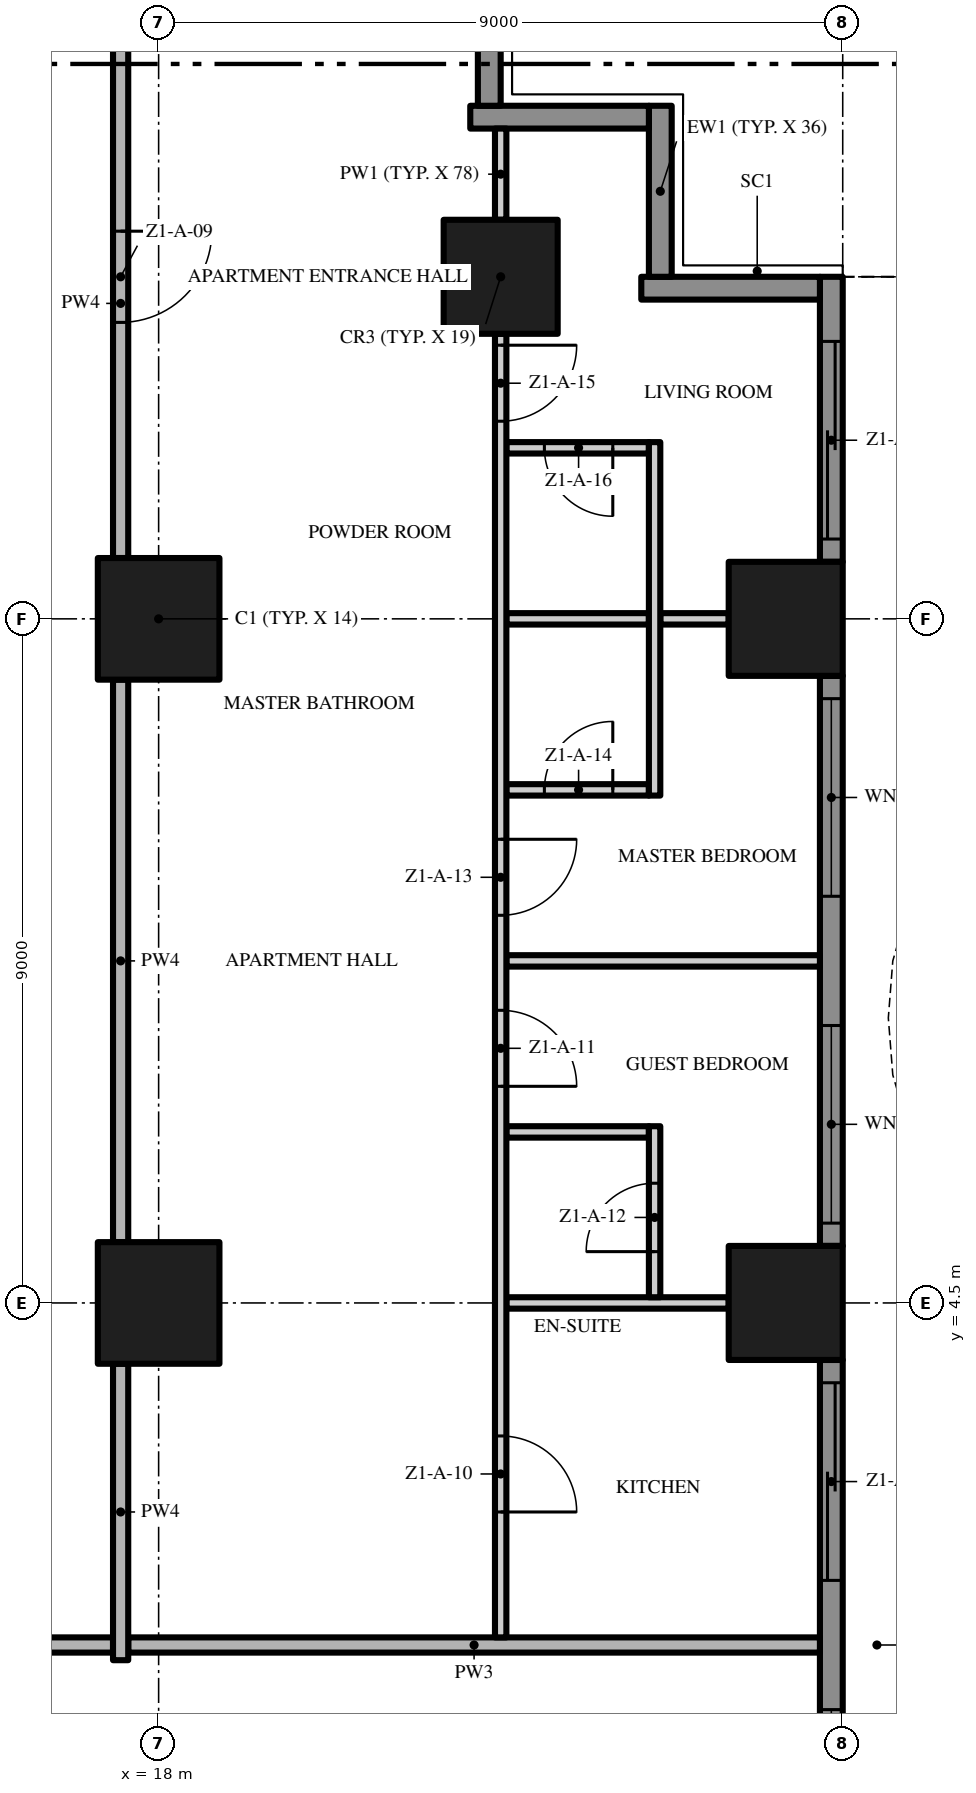
"""IFC4 building model, lengths in metres.
Left out: names, types, materials, properties, quantities, classifications, styles, units other than length and angle.
Written with IfcOpenShell. Run it as: python <this file> out.ifc"""

import sys

from ifc_helpers import new_model, si_unit, direction, frame, frame_2d, origin, origin_2d, place, context, subcontext, project, spatial, polyline, rectangle, outline, extrude, element, fill, save


model = new_model("IFC4")
c1 = context("Model", 3, precision=1e-05, world=origin(), true_north=direction((0.0, 1.0)))
c2 = subcontext(c1, "Body", "Model", "MODEL_VIEW")
j1 = project(units=[si_unit("LENGTHUNIT", "METRE"), si_unit("PLANEANGLEUNIT", "RADIAN")], contexts=[c1])
p1 = place(None, origin())
s1 = spatial("IfcSite", under=j1, at=p1, CompositionType="ELEMENT")
p2 = place(p1, origin())
s2 = spatial("IfcBuilding", under=s1, at=p2, CompositionType="ELEMENT")
p3 = place(p2, frame((0.0, 0.0, 15.0)))
s3 = spatial("IfcBuildingStorey", under=s2, at=p3, CompositionType="ELEMENT", Elevation=15.0)
for number, where, z_axis, x_axis in (
    (1, (18.0, 13.5, 0.0), (0.0, 0.0, 1.0), (1.0, 0.0, 0.0)),
    (2, (18.0, 4.5, 0.0), (0.0, 0.0, 1.0), (1.0, 0.0, 0.0)),
):
    element("IfcColumn", number, at=place(p3, frame(where, z_axis=z_axis, x_axis=x_axis)), inside=s3, PredefinedType="COLUMN", context=c2, shape_type="SweptSolid", body=[
        extrude(rectangle(XDim=1.6, YDim=1.6, at=origin_2d()), origin(), (0.0, 0.0, 1.0), 3.5),
    ])
for number, where, z_axis, x_axis in (
    (3, (26.25, 13.5, 0.0), (0.0, 0.0, 1.0), (1.0, 0.0, 0.0)),
    (4, (22.5, 18.0, 0.0), (0.0, 0.0, 1.0), (1.0, 0.0, 0.0)),
    (5, (26.25, 4.5, 0.0), (0.0, 0.0, 1.0), (1.0, 0.0, 0.0)),
):
    element("IfcColumn", number, at=place(p3, frame(where, z_axis=z_axis, x_axis=x_axis)), inside=s3, PredefinedType="COLUMN", context=c2, shape_type="SweptSolid", body=[
        extrude(rectangle(XDim=1.5, YDim=1.5, at=origin_2d()), origin(), (0.0, 0.0, 1.0), 3.5),
    ])
p4 = place(p3, frame((26.85, 3.75, 0.0), z_axis=(0.0, 0.0, 1.0), x_axis=(0.0, -1.0, 0.0)))
e6 = element("IfcWall", 6, at=p4, inside=s3, PredefinedType="SOLIDWALL", context=c2, shape_type="SweptSolid", body=[
    extrude(rectangle(XDim=7.5, YDim=0.3, at=frame_2d((3.75, 0.0))), origin(), (0.0, 0.0, 1.0), 3.5),
])
p5 = place(p4, frame((4.6, 0.0, 0.45)))
e7 = element("IfcOpeningElement", 7, at=p5, cuts=e6, PredefinedType="OPENING", context=c2, shape_type="SweptSolid", body=[
    extrude(rectangle(XDim=2.6, YDim=2.65, at=frame_2d((1.3, 1.325))), frame((0.0, 0.16, 0.0), z_axis=(0.0, -1.0, 0.0), x_axis=(1.0, 0.0, 0.0)), (0.0, 0.0, 1.0), 0.32),
])
p6 = place(p4, frame((0.3, 0.0, 0.0)))
e8 = element("IfcOpeningElement", 8, at=p6, cuts=e6, PredefinedType="OPENING", context=c2, shape_type="SweptSolid", body=[
    extrude(rectangle(XDim=2.6, YDim=2.4, at=frame_2d((1.3, 1.2))), frame((0.0, 0.16, 0.0), z_axis=(0.0, -1.0, 0.0), x_axis=(1.0, 0.0, 0.0)), (0.0, 0.0, 1.0), 0.32),
])
p7 = place(p3, frame((26.85, 12.75, 0.0), z_axis=(0.0, 0.0, 1.0), x_axis=(0.0, -1.0, 0.0)))
e9 = element("IfcWall", 9, at=p7, inside=s3, PredefinedType="SOLIDWALL", context=c2, shape_type="SweptSolid", body=[
    extrude(rectangle(XDim=7.5, YDim=0.3, at=frame_2d((3.75, 0.0))), origin(), (0.0, 0.0, 1.0), 3.5),
])
p8 = place(p7, frame((4.6, 0.0, 0.45)))
e10 = element("IfcOpeningElement", 10, at=p8, cuts=e9, PredefinedType="OPENING", context=c2, shape_type="SweptSolid", body=[
    extrude(rectangle(XDim=2.6, YDim=2.65, at=frame_2d((1.3, 1.325))), frame((0.0, 0.16, 0.0), z_axis=(0.0, -1.0, 0.0), x_axis=(1.0, 0.0, 0.0)), (0.0, 0.0, 1.0), 0.32),
])
p9 = place(p7, frame((0.3, 0.0, 0.45)))
e11 = element("IfcOpeningElement", 11, at=p9, cuts=e9, PredefinedType="OPENING", context=c2, shape_type="SweptSolid", body=[
    extrude(rectangle(XDim=2.6, YDim=2.65, at=frame_2d((1.3, 1.325))), frame((0.0, 0.16, 0.0), z_axis=(0.0, -1.0, 0.0), x_axis=(1.0, 0.0, 0.0)), (0.0, 0.0, 1.0), 0.32),
])
p10 = place(p3, frame((26.85, 18.0, 0.0), z_axis=(0.0, 0.0, 1.0), x_axis=(0.0, -1.0, 0.0)))
e12 = element("IfcWall", 12, at=p10, inside=s3, PredefinedType="SOLIDWALL", context=c2, shape_type="SweptSolid", body=[
    extrude(rectangle(XDim=3.75, YDim=0.3, at=frame_2d((1.875, 0.0))), origin(), (0.0, 0.0, 1.0), 3.5),
])
p11 = place(p10, frame((0.85, 0.0, 0.0)))
e13 = element("IfcOpeningElement", 13, at=p11, cuts=e12, PredefinedType="OPENING", context=c2, shape_type="SweptSolid", body=[
    extrude(rectangle(XDim=2.6, YDim=2.4, at=frame_2d((1.3, 1.2))), frame((0.0, 0.16, 0.0), z_axis=(0.0, -1.0, 0.0), x_axis=(1.0, 0.0, 0.0)), (0.0, 0.0, 1.0), 0.32),
])
p12 = place(p3, frame((24.35, 17.85, 0.0), z_axis=(0.0, 0.0, 1.0), x_axis=(1.0, 0.0, 0.0)))
e14 = element("IfcWall", 14, at=p12, inside=s3, PredefinedType="SOLIDWALL", context=c2, shape_type="SweptSolid", body=[
    extrude(rectangle(XDim=2.35, YDim=0.3, at=frame_2d((1.175, 0.0))), origin(), (0.0, 0.0, 1.0), 3.5),
])
p13 = place(p3, frame((24.6, 20.25, 0.0), z_axis=(0.0, 0.0, 1.0), x_axis=(0.0, -1.0, 0.0)))
e15 = element("IfcWall", 15, at=p13, inside=s3, PredefinedType="SOLIDWALL", context=c2, shape_type="SweptSolid", body=[
    extrude(rectangle(XDim=2.25, YDim=0.3, at=frame_2d((1.125, 0.0))), origin(), (0.0, 0.0, 1.0), 3.5),
])
p14 = place(p3, frame((22.1, 20.1, 0.0), z_axis=(0.0, 0.0, 1.0), x_axis=(1.0, 0.0, 0.0)))
e16 = element("IfcWall", 16, at=p14, inside=s3, PredefinedType="SOLIDWALL", context=c2, shape_type="SweptSolid", body=[
    extrude(rectangle(XDim=2.35, YDim=0.3, at=frame_2d((1.175, 0.0))), origin(), (0.0, 0.0, 1.0), 3.5),
])
p15 = place(p3, frame((22.35, 22.5, 0.0), z_axis=(0.0, 0.0, 1.0), x_axis=(0.0, -1.0, 0.0)))
e17 = element("IfcWall", 17, at=p15, inside=s3, PredefinedType="SOLIDWALL", context=c2, shape_type="SweptSolid", body=[
    extrude(rectangle(XDim=2.25, YDim=0.3, at=frame_2d((1.125, 0.0))), origin(), (0.0, 0.0, 1.0), 3.5),
])
p16 = place(p3, origin())
e18 = element("IfcWall", 18, at=p16, inside=s3, PredefinedType="USERDEFINED", context=c2, shape_type="SweptSolid", body=[
    extrude(outline(polyline([(28.8, -18.0), (29.505, -16.5), (29.941, -15.0), (30.0, -14.25), (29.941, -13.5), (29.505, -12.0), (28.8, -10.5), (28.095, -9.0), (27.659, -7.5), (27.6, -6.75), (27.659, -6.0), (28.095, -4.5), (28.8, -3.0), (29.505, -1.5), (29.941, 0.0), (30.0, 0.75), (29.941, 1.5), (29.505, 3.0), (28.8, 4.5), (28.095, 6.0), (27.659, 7.5), (27.6, 8.25), (27.659, 9.0), (28.095, 10.5), (28.8, 12.0), (29.505, 13.5), (29.941, 15.0), (30.0, 15.75), (29.941, 16.5), (29.505, 18.0), (29.265, 17.93), (29.694, 16.455), (29.749, 15.75), (29.694, 15.045), (29.271, 13.589), (28.574, 12.106), (27.86, 10.589), (27.411, 9.045), (27.349, 8.25), (27.411, 7.455), (27.86, 5.911), (28.574, 4.394), (29.271, 2.911), (29.694, 1.455), (29.749, 0.75), (29.694, 0.045), (29.271, -1.411), (28.574, -2.894), (27.86, -4.411), (27.411, -5.955), (27.349, -6.75), (27.411, -7.545), (27.86, -9.089), (28.574, -10.606), (29.271, -12.089), (29.694, -13.545), (29.749, -14.25), (29.694, -14.955), (29.271, -16.411), (28.574, -17.894), (28.8, -18.0)])), origin(), (0.0, 0.0, 1.0), 0.9),
])
p17 = place(p3, frame((17.4, 0.0, 0.0), z_axis=(0.0, 0.0, 1.0), x_axis=(-1.0, 0.0, 0.0)))
e19 = element("IfcWall", 19, at=p17, inside=s3, PredefinedType="PARTITIONING", context=c2, shape_type="SweptSolid", body=[
    extrude(rectangle(XDim=17.3, YDim=0.2, at=frame_2d((8.65, 0.0))), origin(), (0.0, 0.0, 1.0), 3.5),
])
p18 = place(p17, frame((7.65, 0.0, 0.0)))
e20 = element("IfcOpeningElement", 20, at=p18, cuts=e19, PredefinedType="OPENING", context=c2, shape_type="SweptSolid", body=[
    extrude(rectangle(XDim=1.5, YDim=2.4, at=frame_2d((0.75, 1.2))), frame((0.0, 0.11, 0.0), z_axis=(0.0, -1.0, 0.0), x_axis=(1.0, 0.0, 0.0)), (0.0, 0.0, 1.0), 0.22),
])
p19 = place(p3, frame((17.6, 0.0, 0.0), z_axis=(0.0, 0.0, 1.0), x_axis=(1.0, 0.0, 0.0)))
e21 = element("IfcWall", 21, at=p19, inside=s3, PredefinedType="PARTITIONING", context=c2, shape_type="SweptSolid", body=[
    extrude(rectangle(XDim=9.1, YDim=0.2, at=frame_2d((4.55, 0.0))), origin(), (0.0, 0.0, 1.0), 3.5),
])
p20 = place(p3, frame((22.575, 4.5, 0.0), z_axis=(0.0, 0.0, 1.0), x_axis=(1.0, 0.0, 0.0)))
e22 = element("IfcWall", 22, at=p20, inside=s3, PredefinedType="PARTITIONING", context=c2, shape_type="SweptSolid", body=[
    extrude(rectangle(XDim=2.925, YDim=0.15, at=frame_2d((1.462, 0.0))), origin(), (0.0, 0.0, 1.0), 3.5),
])
p21 = place(p3, frame((22.575, 6.75, 0.0), z_axis=(0.0, 0.0, 1.0), x_axis=(1.0, 0.0, 0.0)))
e23 = element("IfcWall", 23, at=p21, inside=s3, PredefinedType="PARTITIONING", context=c2, shape_type="SweptSolid", body=[
    extrude(rectangle(XDim=1.875, YDim=0.15, at=frame_2d((0.938, 0.0))), origin(), (0.0, 0.0, 1.0), 3.5),
])
p22 = place(p3, frame((22.575, 9.0, 0.0), z_axis=(0.0, 0.0, 1.0), x_axis=(1.0, 0.0, 0.0)))
e24 = element("IfcWall", 24, at=p22, inside=s3, PredefinedType="PARTITIONING", context=c2, shape_type="SweptSolid", body=[
    extrude(rectangle(XDim=4.125, YDim=0.15, at=frame_2d((2.062, 0.0))), origin(), (0.0, 0.0, 1.0), 3.5),
])
p23 = place(p3, frame((22.575, 11.25, 0.0), z_axis=(0.0, 0.0, 1.0), x_axis=(1.0, 0.0, 0.0)))
e25 = element("IfcWall", 25, at=p23, inside=s3, PredefinedType="PARTITIONING", context=c2, shape_type="SweptSolid", body=[
    extrude(rectangle(XDim=1.875, YDim=0.15, at=frame_2d((0.938, 0.0))), origin(), (0.0, 0.0, 1.0), 3.5),
])
p24 = place(p23, frame((0.5, 0.0, 0.0)))
e26 = element("IfcOpeningElement", 26, at=p24, cuts=e25, PredefinedType="OPENING", context=c2, shape_type="SweptSolid", body=[
    extrude(rectangle(XDim=0.9, YDim=2.1, at=frame_2d((0.45, 1.05))), frame((0.0, 0.085, 0.0), z_axis=(0.0, -1.0, 0.0), x_axis=(1.0, 0.0, 0.0)), (0.0, 0.0, 1.0), 0.17),
])
p25 = place(p3, frame((22.575, 13.5, 0.0), z_axis=(0.0, 0.0, 1.0), x_axis=(1.0, 0.0, 0.0)))
e27 = element("IfcWall", 27, at=p25, inside=s3, PredefinedType="PARTITIONING", context=c2, shape_type="SweptSolid", body=[
    extrude(rectangle(XDim=1.875, YDim=0.15, at=frame_2d((0.938, 0.0))), origin(), (0.0, 0.0, 1.0), 3.5),
])
p26 = place(p3, frame((24.6, 13.5, 0.0), z_axis=(0.0, 0.0, 1.0), x_axis=(1.0, 0.0, 0.0)))
e28 = element("IfcWall", 28, at=p26, inside=s3, PredefinedType="PARTITIONING", context=c2, shape_type="SweptSolid", body=[
    extrude(rectangle(XDim=0.9, YDim=0.15, at=frame_2d((0.45, 0.0))), origin(), (0.0, 0.0, 1.0), 3.5),
])
p27 = place(p3, frame((24.45, 15.75, 0.0), z_axis=(0.0, 0.0, 1.0), x_axis=(-1.0, 0.0, 0.0)))
e29 = element("IfcWall", 29, at=p27, inside=s3, PredefinedType="PARTITIONING", context=c2, shape_type="SweptSolid", body=[
    extrude(rectangle(XDim=1.875, YDim=0.15, at=frame_2d((0.938, 0.0))), origin(), (0.0, 0.0, 1.0), 3.5),
])
p28 = place(p27, frame((0.475, 0.0, 0.0)))
e30 = element("IfcOpeningElement", 30, at=p28, cuts=e29, PredefinedType="OPENING", context=c2, shape_type="SweptSolid", body=[
    extrude(rectangle(XDim=0.9, YDim=2.1, at=frame_2d((0.45, 1.05))), frame((0.0, 0.085, 0.0), z_axis=(0.0, -1.0, 0.0), x_axis=(1.0, 0.0, 0.0)), (0.0, 0.0, 1.0), 0.17),
])
p29 = place(p3, frame((17.5, -0.2, 0.0), z_axis=(0.0, 0.0, 1.0), x_axis=(0.0, 1.0, 0.0)))
e31 = element("IfcWall", 31, at=p29, inside=s3, PredefinedType="PARTITIONING", context=c2, shape_type="SweptSolid", body=[
    extrude(rectangle(XDim=3.9, YDim=0.2, at=frame_2d((1.95, 0.0))), origin(), (0.0, 0.0, 1.0), 3.5),
])
p30 = place(p3, frame((17.5, 5.3, 0.0), z_axis=(0.0, 0.0, 1.0), x_axis=(0.0, 1.0, 0.0)))
e32 = element("IfcWall", 32, at=p30, inside=s3, PredefinedType="PARTITIONING", context=c2, shape_type="SweptSolid", body=[
    extrude(rectangle(XDim=7.4, YDim=0.2, at=frame_2d((3.7, 0.0))), origin(), (0.0, 0.0, 1.0), 3.5),
])
p31 = place(p3, frame((17.5, 21.0, 0.0), z_axis=(0.0, 0.0, 1.0), x_axis=(0.0, -1.0, 0.0)))
e33 = element("IfcWall", 33, at=p31, inside=s3, PredefinedType="PARTITIONING", context=c2, shape_type="SweptSolid", body=[
    extrude(rectangle(XDim=6.7, YDim=0.2, at=frame_2d((3.35, 0.0))), origin(), (0.0, 0.0, 1.0), 3.5),
])
p32 = place(p31, frame((2.4, 0.0, 0.0)))
e34 = element("IfcOpeningElement", 34, at=p32, cuts=e33, PredefinedType="OPENING", context=c2, shape_type="SweptSolid", body=[
    extrude(rectangle(XDim=1.2, YDim=2.4, at=frame_2d((0.6, 1.2))), frame((0.0, 0.11, 0.0), z_axis=(0.0, -1.0, 0.0), x_axis=(1.0, 0.0, 0.0)), (0.0, 0.0, 1.0), 0.22),
])
p33 = place(p3, frame((22.5, 17.25, 0.0), z_axis=(0.0, 0.0, 1.0), x_axis=(0.0, -1.0, 0.0)))
e35 = element("IfcWall", 35, at=p33, inside=s3, PredefinedType="PARTITIONING", context=c2, shape_type="SweptSolid", body=[
    extrude(rectangle(XDim=17.15, YDim=0.15, at=frame_2d((8.575, 0.0))), origin(), (0.0, 0.0, 1.0), 3.5),
])
p34 = place(p33, frame((14.5, 0.0, 0.0)))
e36 = element("IfcOpeningElement", 36, at=p34, cuts=e35, PredefinedType="OPENING", context=c2, shape_type="SweptSolid", body=[
    extrude(rectangle(XDim=1.0, YDim=2.4, at=frame_2d((0.5, 1.2))), frame((0.0, 0.085, 0.0), z_axis=(0.0, -1.0, 0.0), x_axis=(1.0, 0.0, 0.0)), (0.0, 0.0, 1.0), 0.17),
])
p35 = place(p33, frame((8.9, 0.0, 0.0)))
e37 = element("IfcOpeningElement", 37, at=p35, cuts=e35, PredefinedType="OPENING", context=c2, shape_type="SweptSolid", body=[
    extrude(rectangle(XDim=1.0, YDim=2.4, at=frame_2d((0.5, 1.2))), frame((0.0, 0.085, 0.0), z_axis=(0.0, -1.0, 0.0), x_axis=(1.0, 0.0, 0.0)), (0.0, 0.0, 1.0), 0.17),
])
p36 = place(p33, frame((6.65, 0.0, 0.0)))
e38 = element("IfcOpeningElement", 38, at=p36, cuts=e35, PredefinedType="OPENING", context=c2, shape_type="SweptSolid", body=[
    extrude(rectangle(XDim=1.0, YDim=2.4, at=frame_2d((0.5, 1.2))), frame((0.0, 0.085, 0.0), z_axis=(0.0, -1.0, 0.0), x_axis=(1.0, 0.0, 0.0)), (0.0, 0.0, 1.0), 0.17),
])
p37 = place(p33, frame((0.15, 0.0, 0.0)))
e39 = element("IfcOpeningElement", 39, at=p37, cuts=e35, PredefinedType="OPENING", context=c2, shape_type="SweptSolid", body=[
    extrude(rectangle(XDim=1.0, YDim=2.4, at=frame_2d((0.5, 1.2))), frame((0.0, 0.085, 0.0), z_axis=(0.0, -1.0, 0.0), x_axis=(1.0, 0.0, 0.0)), (0.0, 0.0, 1.0), 0.17),
])
p38 = place(p3, frame((22.5, 18.75, 0.0), z_axis=(0.0, 0.0, 1.0), x_axis=(0.0, 1.0, 0.0)))
e40 = element("IfcWall", 40, at=p38, inside=s3, PredefinedType="PARTITIONING", context=c2, shape_type="SweptSolid", body=[
    extrude(rectangle(XDim=1.2, YDim=0.15, at=frame_2d((0.6, 0.0))), origin(), (0.0, 0.0, 1.0), 3.5),
])
p39 = place(p3, frame((24.525, 4.575, 0.0), z_axis=(0.0, 0.0, 1.0), x_axis=(0.0, 1.0, 0.0)))
e41 = element("IfcWall", 41, at=p39, inside=s3, PredefinedType="PARTITIONING", context=c2, shape_type="SweptSolid", body=[
    extrude(rectangle(XDim=2.25, YDim=0.15, at=frame_2d((1.125, 0.0))), origin(), (0.0, 0.0, 1.0), 3.5),
])
p40 = place(p39, frame((0.6, 0.0, 0.0)))
e42 = element("IfcOpeningElement", 42, at=p40, cuts=e41, PredefinedType="OPENING", context=c2, shape_type="SweptSolid", body=[
    extrude(rectangle(XDim=0.9, YDim=2.1, at=frame_2d((0.45, 1.05))), frame((0.0, 0.085, 0.0), z_axis=(0.0, -1.0, 0.0), x_axis=(1.0, 0.0, 0.0)), (0.0, 0.0, 1.0), 0.17),
])
p41 = place(p3, frame((24.525, 11.175, 0.0), z_axis=(0.0, 0.0, 1.0), x_axis=(0.0, 1.0, 0.0)))
e43 = element("IfcWall", 43, at=p41, inside=s3, PredefinedType="PARTITIONING", context=c2, shape_type="SweptSolid", body=[
    extrude(rectangle(XDim=4.65, YDim=0.15, at=frame_2d((2.325, 0.0))), origin(), (0.0, 0.0, 1.0), 3.5),
])
p42 = place(p5, origin())
e44 = element("IfcWindow", 44, at=p42, inside=s3, PartitioningType="SINGLE_PANEL", PredefinedType="WINDOW", context=c2, shape_type="SweptSolid", body=[
    extrude(rectangle(XDim=2.6, YDim=2.65, at=frame_2d((1.3, 1.325))), frame((0.0, 0.03, 0.0), z_axis=(0.0, -1.0, 0.0), x_axis=(1.0, 0.0, 0.0)), (0.0, 0.0, 1.0), 0.06),
])
fill(e7, e44)
p43 = place(p6, origin())
e45 = element("IfcDoor", 45, at=p43, inside=s3, OperationType="SINGLE_SWING_LEFT", PredefinedType="DOOR", context=c2, shape_type="SweptSolid", body=[
    extrude(rectangle(XDim=2.6, YDim=2.4, at=frame_2d((1.3, 1.2))), frame((0.0, 0.025, 0.0), z_axis=(0.0, -1.0, 0.0), x_axis=(1.0, 0.0, 0.0)), (0.0, 0.0, 1.0), 0.05),
])
fill(e8, e45)
p44 = place(p8, origin())
e46 = element("IfcWindow", 46, at=p44, inside=s3, PartitioningType="SINGLE_PANEL", PredefinedType="WINDOW", context=c2, shape_type="SweptSolid", body=[
    extrude(rectangle(XDim=2.6, YDim=2.65, at=frame_2d((1.3, 1.325))), frame((0.0, 0.03, 0.0), z_axis=(0.0, -1.0, 0.0), x_axis=(1.0, 0.0, 0.0)), (0.0, 0.0, 1.0), 0.06),
])
fill(e10, e46)
p45 = place(p9, origin())
e47 = element("IfcWindow", 47, at=p45, inside=s3, PartitioningType="SINGLE_PANEL", PredefinedType="WINDOW", context=c2, shape_type="SweptSolid", body=[
    extrude(rectangle(XDim=2.6, YDim=2.65, at=frame_2d((1.3, 1.325))), frame((0.0, 0.03, 0.0), z_axis=(0.0, -1.0, 0.0), x_axis=(1.0, 0.0, 0.0)), (0.0, 0.0, 1.0), 0.06),
])
fill(e11, e47)
p46 = place(p11, origin())
e48 = element("IfcDoor", 48, at=p46, inside=s3, OperationType="SINGLE_SWING_LEFT", PredefinedType="DOOR", context=c2, shape_type="SweptSolid", body=[
    extrude(rectangle(XDim=2.6, YDim=2.4, at=frame_2d((1.3, 1.2))), frame((0.0, 0.025, 0.0), z_axis=(0.0, -1.0, 0.0), x_axis=(1.0, 0.0, 0.0)), (0.0, 0.0, 1.0), 0.05),
])
fill(e13, e48)
p47 = place(p32, origin())
e49 = element("IfcDoor", 49, at=p47, inside=s3, OperationType="SINGLE_SWING_LEFT", PredefinedType="DOOR", context=c2, shape_type="SweptSolid", body=[
    extrude(rectangle(XDim=1.2, YDim=2.4, at=frame_2d((0.6, 1.2))), frame((0.0, 0.025, 0.0), z_axis=(0.0, -1.0, 0.0), x_axis=(1.0, 0.0, 0.0)), (0.0, 0.0, 1.0), 0.05),
])
fill(e34, e49)
p48 = place(p34, origin())
e50 = element("IfcDoor", 50, at=p48, inside=s3, OperationType="SINGLE_SWING_RIGHT", PredefinedType="DOOR", context=c2, shape_type="SweptSolid", body=[
    extrude(rectangle(XDim=1.0, YDim=2.4, at=frame_2d((0.5, 1.2))), frame((0.0, 0.025, 0.0), z_axis=(0.0, -1.0, 0.0), x_axis=(1.0, 0.0, 0.0)), (0.0, 0.0, 1.0), 0.05),
])
fill(e36, e50)
p49 = place(p35, origin())
e51 = element("IfcDoor", 51, at=p49, inside=s3, OperationType="SINGLE_SWING_RIGHT", PredefinedType="DOOR", context=c2, shape_type="SweptSolid", body=[
    extrude(rectangle(XDim=1.0, YDim=2.4, at=frame_2d((0.5, 1.2))), frame((0.0, 0.025, 0.0), z_axis=(0.0, -1.0, 0.0), x_axis=(1.0, 0.0, 0.0)), (0.0, 0.0, 1.0), 0.05),
])
fill(e37, e51)
p50 = place(p40, origin())
e52 = element("IfcDoor", 52, at=p50, inside=s3, OperationType="SINGLE_SWING_LEFT", PredefinedType="DOOR", context=c2, shape_type="SweptSolid", body=[
    extrude(rectangle(XDim=0.9, YDim=2.1, at=frame_2d((0.45, 1.05))), frame((0.0, 0.025, 0.0), z_axis=(0.0, -1.0, 0.0), x_axis=(1.0, 0.0, 0.0)), (0.0, 0.0, 1.0), 0.05),
])
fill(e42, e52)
p51 = place(p36, origin())
e53 = element("IfcDoor", 53, at=p51, inside=s3, OperationType="SINGLE_SWING_LEFT", PredefinedType="DOOR", context=c2, shape_type="SweptSolid", body=[
    extrude(rectangle(XDim=1.0, YDim=2.4, at=frame_2d((0.5, 1.2))), frame((0.0, 0.025, 0.0), z_axis=(0.0, -1.0, 0.0), x_axis=(1.0, 0.0, 0.0)), (0.0, 0.0, 1.0), 0.05),
])
fill(e38, e53)
p52 = place(p24, origin())
e54 = element("IfcDoor", 54, at=p52, inside=s3, OperationType="SINGLE_SWING_RIGHT", PredefinedType="DOOR", context=c2, shape_type="SweptSolid", body=[
    extrude(rectangle(XDim=0.9, YDim=2.1, at=frame_2d((0.45, 1.05))), frame((0.0, 0.025, 0.0), z_axis=(0.0, -1.0, 0.0), x_axis=(1.0, 0.0, 0.0)), (0.0, 0.0, 1.0), 0.05),
])
fill(e26, e54)
p53 = place(p37, origin())
e55 = element("IfcDoor", 55, at=p53, inside=s3, OperationType="SINGLE_SWING_LEFT", PredefinedType="DOOR", context=c2, shape_type="SweptSolid", body=[
    extrude(rectangle(XDim=1.0, YDim=2.4, at=frame_2d((0.5, 1.2))), frame((0.0, 0.025, 0.0), z_axis=(0.0, -1.0, 0.0), x_axis=(1.0, 0.0, 0.0)), (0.0, 0.0, 1.0), 0.05),
])
fill(e39, e55)
p54 = place(p28, origin())
e56 = element("IfcDoor", 56, at=p54, inside=s3, OperationType="SINGLE_SWING_LEFT", PredefinedType="DOOR", context=c2, shape_type="SweptSolid", body=[
    extrude(rectangle(XDim=0.9, YDim=2.1, at=frame_2d((0.45, 1.05))), frame((0.0, 0.025, 0.0), z_axis=(0.0, -1.0, 0.0), x_axis=(1.0, 0.0, 0.0)), (0.0, 0.0, 1.0), 0.05),
])
fill(e30, e56)
save(model, sys.argv[1])
